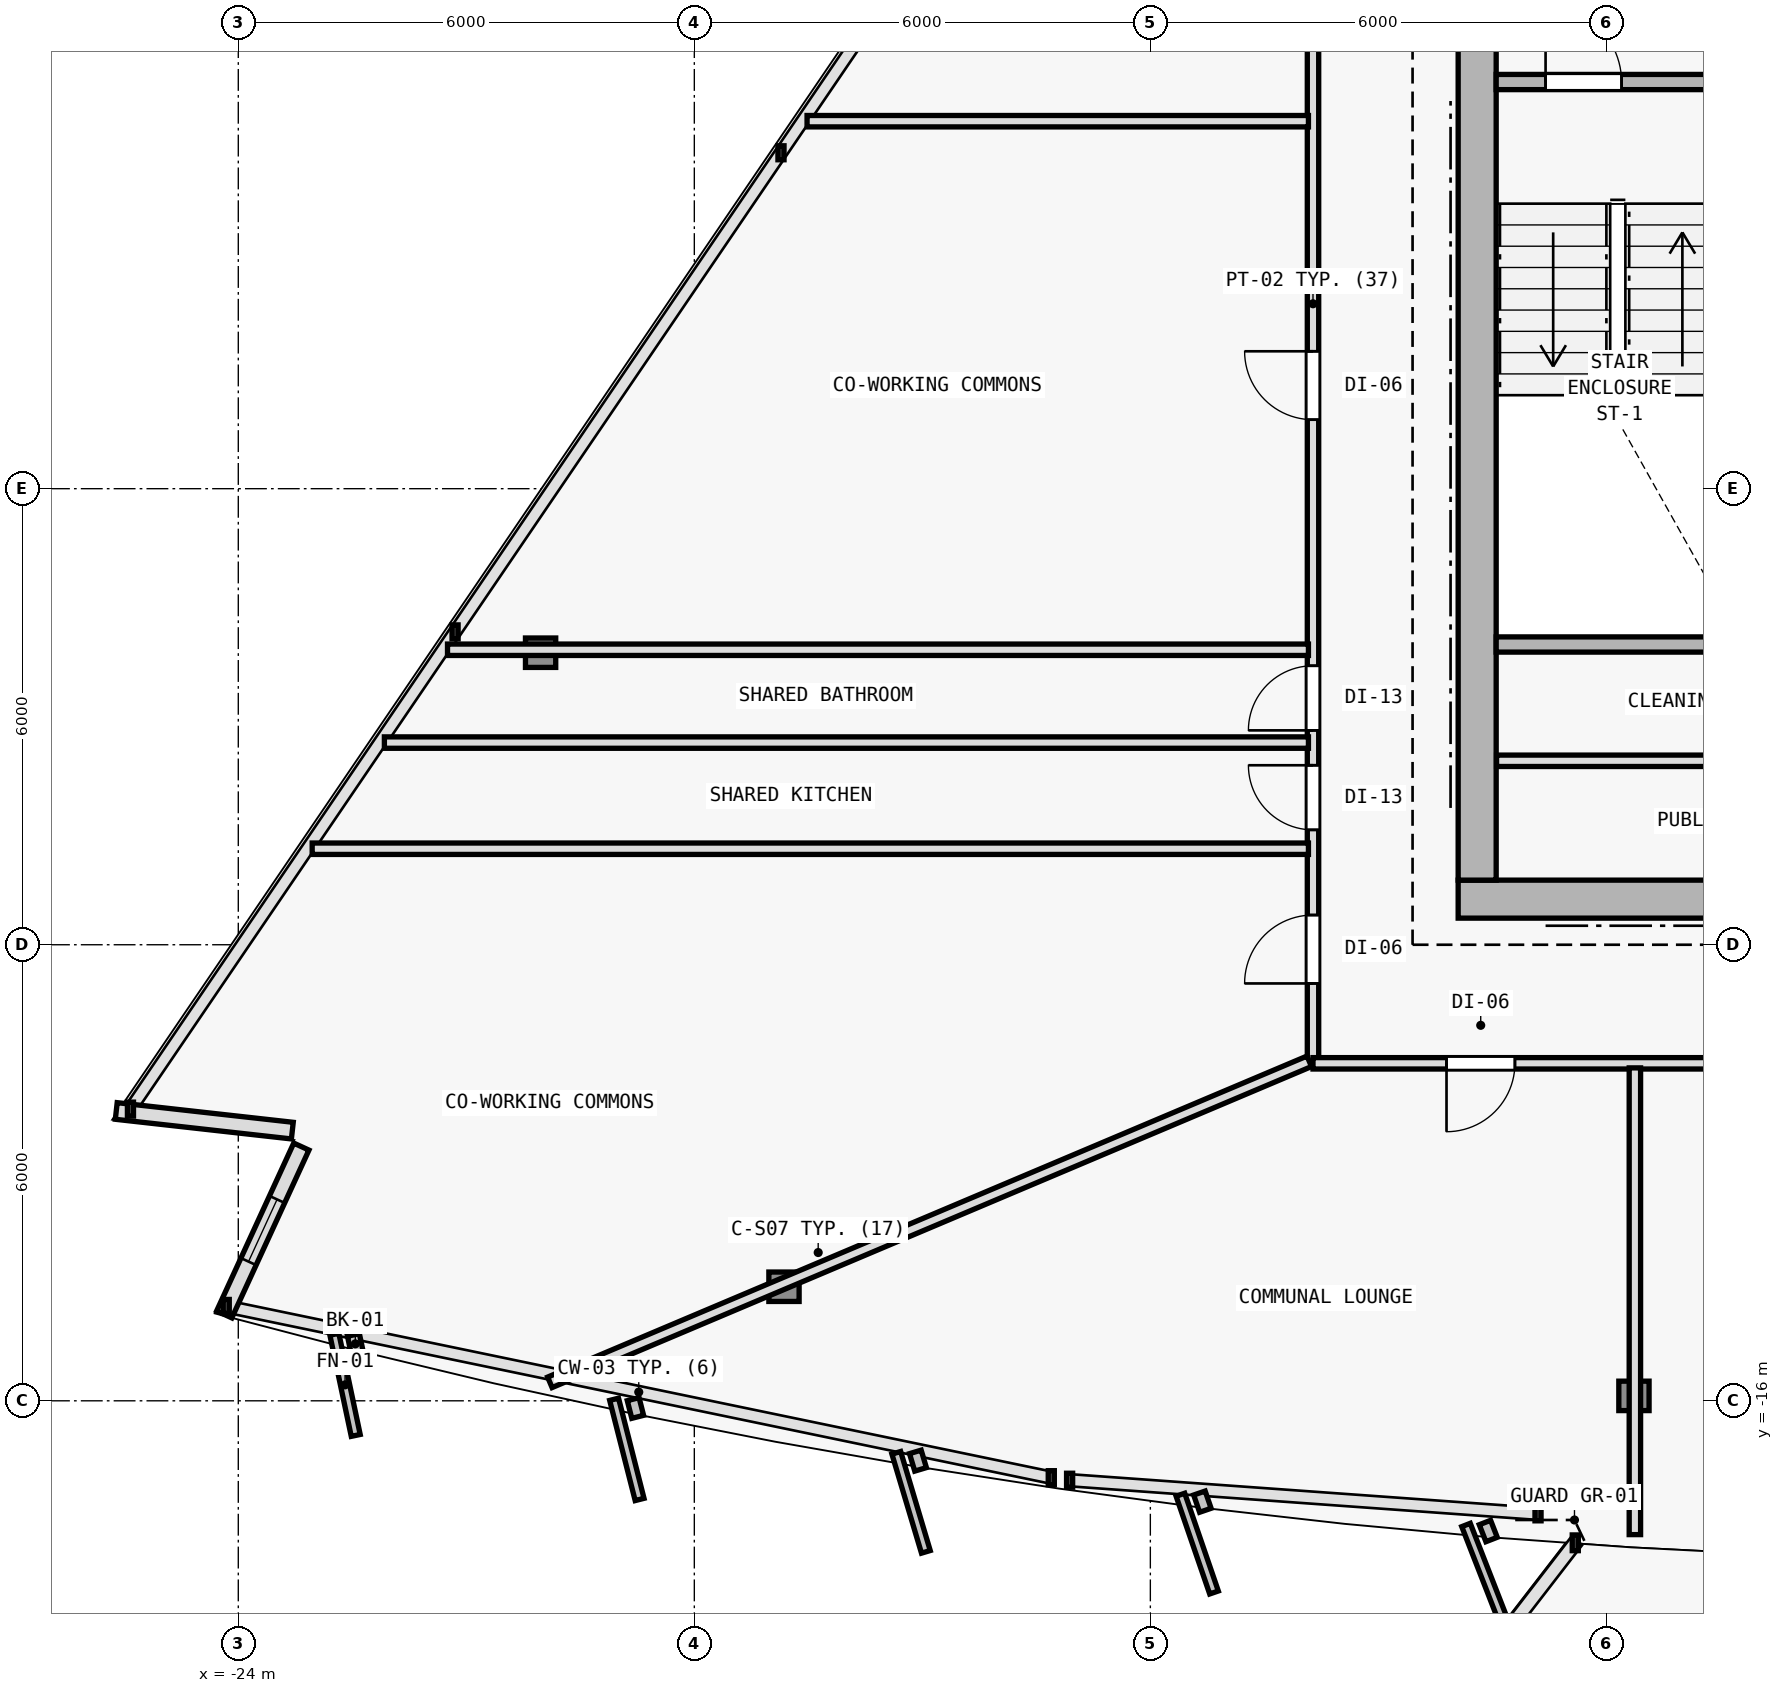
"""IFC4 building model, lengths in metres.
Left out: names, types, materials, properties, quantities, classifications, styles, units other than length and angle.
Written with IfcOpenShell. Run it as: python <this file> out.ifc"""

import sys

from ifc_helpers import new_model, si_unit, direction, frame, frame_2d, origin, origin_2d, place, context, subcontext, project, spatial, rectangle, i_section, extrude, element, fill, save


model = new_model("IFC4")
c1 = context("Model", 3, precision=1e-05, world=origin(), true_north=direction((0.0, 1.0)))
c2 = subcontext(c1, "Body", "Model", "MODEL_VIEW")
j1 = project(units=[si_unit("LENGTHUNIT", "METRE"), si_unit("PLANEANGLEUNIT", "RADIAN")], contexts=[c1])
p1 = place(None, origin())
s1 = spatial("IfcSite", under=j1, at=p1, CompositionType="ELEMENT")
p2 = place(p1, origin())
s2 = spatial("IfcBuilding", under=s1, at=p2, CompositionType="ELEMENT")
p3 = place(p2, frame((0.0, 0.0, 205.5)))
s3 = spatial("IfcBuildingStorey", under=s2, at=p3, CompositionType="ELEMENT", Elevation=205.5)
p4 = place(p3, frame((-7.7, -9.4, 0.0), z_axis=(0.0, 0.0, 1.0), x_axis=(1.0, 0.0, 0.0)))
e1 = element("IfcColumn", 1, at=p4, inside=s3, PredefinedType="COLUMN", context=c2, shape_type="SweptSolid", body=[
    extrude(i_section(OverallWidth=0.398, OverallDepth=0.387, WebThickness=0.013, FlangeThickness=0.022, FilletRadius=0.015, at=origin_2d()), origin(), (0.0, 0.0, 1.0), 3.6),
])
p5 = place(p3, frame((-16.82, -14.5, 0.006), z_axis=(0.020664238418, 0.033511412961, 0.999224686671), x_axis=(-0.851183725565, 0.524867855115, 0.0)))
e2 = element("IfcColumn", 2, at=p5, inside=s3, PredefinedType="COLUMN", context=c2, shape_type="SweptSolid", body=[
    extrude(i_section(OverallWidth=0.398, OverallDepth=0.387, WebThickness=0.013, FlangeThickness=0.022, FilletRadius=0.015, at=origin_2d()), origin(), (0.0, 0.0, 1.0), 3.592),
])
p6 = place(p3, frame((-5.637, -15.935, 0.006), z_axis=(0.006866308162, 0.0352833063, 0.999353762243), x_axis=(-0.981585848295, 0.191021523464, 0.0)))
e3 = element("IfcColumn", 3, at=p6, inside=s3, PredefinedType="COLUMN", context=c2, shape_type="SweptSolid", body=[
    extrude(i_section(OverallWidth=0.398, OverallDepth=0.387, WebThickness=0.013, FlangeThickness=0.022, FilletRadius=0.015, at=origin_2d()), origin(), (0.0, 0.0, 1.0), 3.591),
])
p7 = place(p3, frame((-20.023, -6.158, 0.006), z_axis=(0.025292109804, 0.02162067451, 0.999446274502), x_axis=(-0.649781149204, 0.760121344352, 0.0)))
e4 = element("IfcColumn", 4, at=p7, inside=s3, PredefinedType="COLUMN", context=c2, shape_type="SweptSolid", body=[
    extrude(i_section(OverallWidth=0.398, OverallDepth=0.387, WebThickness=0.013, FlangeThickness=0.022, FilletRadius=0.015, at=origin_2d()), origin(), (0.0, 0.0, 1.0), 3.591),
])
p8 = place(p3, frame((-23.289, -12.446, 0.0), z_axis=(0.0, 0.0, 1.0), x_axis=(-0.993829972675, 0.110914315635, 0.0)))
e5 = element("IfcWall", 5, at=p8, inside=s3, PredefinedType="SOLIDWALL", context=c2, shape_type="SweptSolid", body=[
    extrude(rectangle(XDim=2.331, YDim=0.22, at=frame_2d((1.166, 0.0))), origin(), (0.0, 0.0, 1.0), 3.35),
])
p9 = place(p3, frame((-24.185, -14.863, 0.0), z_axis=(0.0, 0.0, 1.0), x_axis=(0.417509141111, 0.90867272276, 0.0)))
e6 = element("IfcWall", 6, at=p9, inside=s3, PredefinedType="SOLIDWALL", context=c2, shape_type="SweptSolid", body=[
    extrude(rectangle(XDim=2.43, YDim=0.22, at=frame_2d((1.215, 0.0))), origin(), (0.0, 0.0, 1.0), 3.35),
])
p10 = place(p9, frame((0.765, 0.0, 0.62)))
e7 = element("IfcOpeningElement", 7, at=p10, cuts=e6, PredefinedType="OPENING", context=c2, shape_type="SweptSolid", body=[
    extrude(rectangle(XDim=0.9, YDim=1.6, at=frame_2d((0.45, 0.8))), frame((0.0, 0.12, 0.0), z_axis=(0.0, -1.0, 0.0), x_axis=(1.0, 0.0, 0.0)), (0.0, 0.0, 1.0), 0.24),
])
p11 = place(p3, frame((-7.95, -9.4, 0.0), z_axis=(0.0, 0.0, 1.0), x_axis=(1.0, 0.0, 0.0)))
e8 = element("IfcWall", 8, at=p11, inside=s3, PredefinedType="SHEAR", context=c2, shape_type="SweptSolid", body=[
    extrude(rectangle(XDim=15.9, YDim=0.5, at=frame_2d((7.95, 0.0))), origin(), (0.0, 0.0, 1.0), 3.35),
])
p12 = place(p11, frame((9.6, 0.0, 0.0)))
e9 = element("IfcOpeningElement", 9, at=p12, cuts=e8, PredefinedType="OPENING", context=c2, shape_type="SweptSolid", body=[
    extrude(rectangle(XDim=1.5, YDim=2.2, at=frame_2d((0.75, 1.1))), frame((0.0, 0.26, 0.0), z_axis=(0.0, -1.0, 0.0), x_axis=(1.0, 0.0, 0.0)), (0.0, 0.0, 1.0), 0.52),
])
p13 = place(p3, frame((-7.7, -9.15, 0.0), z_axis=(0.0, 0.0, 1.0), x_axis=(0.0, 1.0, 0.0)))
e10 = element("IfcWall", 10, at=p13, inside=s3, PredefinedType="SHEAR", context=c2, shape_type="SweptSolid", body=[
    extrude(rectangle(XDim=19.1, YDim=0.5, at=frame_2d((9.55, 0.0))), origin(), (0.0, 0.0, 1.0), 3.35),
])
p14 = place(p13, frame((12.7, 0.0, 0.0)))
e11 = element("IfcOpeningElement", 11, at=p14, cuts=e10, PredefinedType="OPENING", context=c2, shape_type="SweptSolid", body=[
    extrude(rectangle(XDim=1.1, YDim=2.15, at=frame_2d((0.55, 1.075))), frame((0.0, 0.26, 0.0), z_axis=(0.0, -1.0, 0.0), x_axis=(1.0, 0.0, 0.0)), (0.0, 0.0, 1.0), 0.52),
])
p15 = place(p3, frame((-7.45, 1.35, 0.0), z_axis=(0.0, 0.0, 1.0), x_axis=(1.0, 0.0, 0.0)))
e12 = element("IfcWall", 12, at=p15, inside=s3, PredefinedType="SOLIDWALL", context=c2, shape_type="SweptSolid", body=[
    extrude(rectangle(XDim=3.4, YDim=0.2, at=frame_2d((1.7, 0.0))), origin(), (0.0, 0.0, 1.0), 3.35),
])
p16 = place(p15, frame((0.65, 0.0, 0.0)))
e13 = element("IfcOpeningElement", 13, at=p16, cuts=e12, PredefinedType="OPENING", context=c2, shape_type="SweptSolid", body=[
    extrude(rectangle(XDim=1.0, YDim=2.15, at=frame_2d((0.5, 1.075))), frame((0.0, 0.11, 0.0), z_axis=(0.0, -1.0, 0.0), x_axis=(1.0, 0.0, 0.0)), (0.0, 0.0, 1.0), 0.22),
])
p17 = place(p3, frame((-7.45, -6.05, 0.0), z_axis=(0.0, 0.0, 1.0), x_axis=(1.0, 0.0, 0.0)))
e14 = element("IfcWall", 14, at=p17, inside=s3, PredefinedType="SOLIDWALL", context=c2, shape_type="SweptSolid", body=[
    extrude(rectangle(XDim=3.4, YDim=0.2, at=frame_2d((1.7, 0.0))), origin(), (0.0, 0.0, 1.0), 3.35),
])
p18 = place(p3, frame((-7.445, -7.58, 0.0), z_axis=(0.0, 0.0, 1.0), x_axis=(1.0, 0.0, 0.0)))
e15 = element("IfcWall", 15, at=p18, inside=s3, PredefinedType="PARTITIONING", context=c2, shape_type="SweptSolid", body=[
    extrude(rectangle(XDim=6.195, YDim=0.15, at=frame_2d((3.098, 0.0))), origin(), (0.0, 0.0, 1.0), 3.35),
])
p19 = place(p3, frame((-9.86, -11.56, 0.0), z_axis=(0.0, 0.0, 1.0), x_axis=(0.0, 1.0, 0.0)))
e16 = element("IfcWall", 16, at=p19, inside=s3, PredefinedType="PARTITIONING", context=c2, shape_type="SweptSolid", body=[
    extrude(rectangle(XDim=19.986, YDim=0.15, at=frame_2d((9.993, 0.0))), origin(), (0.0, 0.0, 1.0), 2.825),
])
p20 = place(p19, frame((8.468, 0.0, 0.0)))
e17 = element("IfcOpeningElement", 17, at=p20, cuts=e16, PredefinedType="OPENING", context=c2, shape_type="SweptSolid", body=[
    extrude(rectangle(XDim=0.9, YDim=2.1, at=frame_2d((0.45, 1.05))), frame((0.0, 0.085, 0.0), z_axis=(0.0, -1.0, 0.0), x_axis=(1.0, 0.0, 0.0)), (0.0, 0.0, 1.0), 0.17),
])
p21 = place(p19, frame((4.38, 0.0, 0.0)))
e18 = element("IfcOpeningElement", 18, at=p21, cuts=e16, PredefinedType="OPENING", context=c2, shape_type="SweptSolid", body=[
    extrude(rectangle(XDim=0.85, YDim=2.1, at=frame_2d((0.425, 1.05))), frame((0.0, 0.085, 0.0), z_axis=(0.0, -1.0, 0.0), x_axis=(1.0, 0.0, 0.0)), (0.0, 0.0, 1.0), 0.17),
])
p22 = place(p19, frame((3.071, 0.0, 0.0)))
e19 = element("IfcOpeningElement", 19, at=p22, cuts=e16, PredefinedType="OPENING", context=c2, shape_type="SweptSolid", body=[
    extrude(rectangle(XDim=0.85, YDim=2.1, at=frame_2d((0.425, 1.05))), frame((0.0, 0.085, 0.0), z_axis=(0.0, -1.0, 0.0), x_axis=(1.0, 0.0, 0.0)), (0.0, 0.0, 1.0), 0.17),
])
p23 = place(p19, frame((1.051, 0.0, 0.0)))
e20 = element("IfcOpeningElement", 20, at=p23, cuts=e16, PredefinedType="OPENING", context=c2, shape_type="SweptSolid", body=[
    extrude(rectangle(XDim=0.9, YDim=2.1, at=frame_2d((0.45, 1.05))), frame((0.0, 0.085, 0.0), z_axis=(0.0, -1.0, 0.0), x_axis=(1.0, 0.0, 0.0)), (0.0, 0.0, 1.0), 0.17),
])
p24 = place(p19, frame((15.651, 0.0, 0.0)))
e21 = element("IfcOpeningElement", 21, at=p24, cuts=e16, PredefinedType="OPENING", context=c2, shape_type="SweptSolid", body=[
    extrude(rectangle(XDim=0.9, YDim=2.1, at=frame_2d((0.45, 1.05))), frame((0.0, 0.085, 0.0), z_axis=(0.0, -1.0, 0.0), x_axis=(1.0, 0.0, 0.0)), (0.0, 0.0, 1.0), 0.17),
])
p25 = place(p3, frame((13.18, -11.56, 0.0), z_axis=(0.0, 0.0, 1.0), x_axis=(-1.0, 0.0, 0.0)))
e22 = element("IfcWall", 22, at=p25, inside=s3, PredefinedType="PARTITIONING", context=c2, shape_type="SweptSolid", body=[
    extrude(rectangle(XDim=23.04, YDim=0.15, at=frame_2d((11.52, 0.0))), origin(), (0.0, 0.0, 1.0), 2.825),
])
p26 = place(p25, frame((20.383, 0.0, 0.0)))
e23 = element("IfcOpeningElement", 23, at=p26, cuts=e22, PredefinedType="OPENING", context=c2, shape_type="SweptSolid", body=[
    extrude(rectangle(XDim=0.9, YDim=2.1, at=frame_2d((0.45, 1.05))), frame((0.0, 0.085, 0.0), z_axis=(0.0, -1.0, 0.0), x_axis=(1.0, 0.0, 0.0)), (0.0, 0.0, 1.0), 0.17),
])
p27 = place(p25, frame((12.73, 0.0, 0.0)))
e24 = element("IfcOpeningElement", 24, at=p27, cuts=e22, PredefinedType="OPENING", context=c2, shape_type="SweptSolid", body=[
    extrude(rectangle(XDim=0.9, YDim=2.1, at=frame_2d((0.45, 1.05))), frame((0.0, 0.085, 0.0), z_axis=(0.0, -1.0, 0.0), x_axis=(1.0, 0.0, 0.0)), (0.0, 0.0, 1.0), 0.17),
])
p28 = place(p25, frame((3.417, 0.0, 0.0)))
e25 = element("IfcOpeningElement", 25, at=p28, cuts=e22, PredefinedType="OPENING", context=c2, shape_type="SweptSolid", body=[
    extrude(rectangle(XDim=0.9, YDim=2.1, at=frame_2d((0.45, 1.05))), frame((0.0, 0.085, 0.0), z_axis=(0.0, -1.0, 0.0), x_axis=(1.0, 0.0, 0.0)), (0.0, 0.0, 1.0), 0.17),
])
p29 = place(p3, frame((-9.909, -11.533, 0.0), z_axis=(0.0, 0.0, 1.0), x_axis=(-0.921088356207, -0.389353618269, 0.0)))
e26 = element("IfcWall", 26, at=p29, inside=s3, PredefinedType="PARTITIONING", context=c2, shape_type="SweptSolid", body=[
    extrude(rectangle(XDim=10.847, YDim=0.15, at=frame_2d((5.424, 0.0))), origin(), (0.0, 0.0, 1.0), 2.775),
])
p30 = place(p3, frame((-5.625, -11.62, 0.0), z_axis=(0.0, 0.0, 1.0), x_axis=(0.0, -1.0, 0.0)))
e27 = element("IfcWall", 27, at=p30, inside=s3, PredefinedType="PARTITIONING", context=c2, shape_type="SweptSolid", body=[
    extrude(rectangle(XDim=6.14, YDim=0.15, at=frame_2d((3.07, 0.0))), origin(), (0.0, 0.0, 1.0), 2.775),
])
p31 = place(p3, frame((-9.92, -6.119, 0.0), z_axis=(0.0, 0.0, 1.0), x_axis=(-1.0, 0.0, 0.0)))
e28 = element("IfcWall", 28, at=p31, inside=s3, PredefinedType="PARTITIONING", context=c2, shape_type="SweptSolid", body=[
    extrude(rectangle(XDim=11.327, YDim=0.15, at=frame_2d((5.664, 0.0))), origin(), (0.0, 0.0, 1.0), 2.775),
])
p32 = place(p3, frame((-9.92, -8.737, 0.0), z_axis=(0.0, 0.0, 1.0), x_axis=(-1.0, 0.0, 0.0)))
e29 = element("IfcWall", 29, at=p32, inside=s3, PredefinedType="PARTITIONING", context=c2, shape_type="SweptSolid", body=[
    extrude(rectangle(XDim=13.108, YDim=0.15, at=frame_2d((6.554, 0.0))), origin(), (0.0, 0.0, 1.0), 2.825),
])
p33 = place(p3, frame((-9.92, -7.34, 0.0), z_axis=(0.0, 0.0, 1.0), x_axis=(-1.0, 0.0, 0.0)))
e30 = element("IfcWall", 30, at=p33, inside=s3, PredefinedType="PARTITIONING", context=c2, shape_type="SweptSolid", body=[
    extrude(rectangle(XDim=12.158, YDim=0.15, at=frame_2d((6.079, 0.0))), origin(), (0.0, 0.0, 1.0), 2.775),
])
p34 = place(p3, frame((-9.92, 0.835, 0.0), z_axis=(0.0, 0.0, 1.0), x_axis=(-1.0, 0.0, 0.0)))
e31 = element("IfcWall", 31, at=p34, inside=s3, PredefinedType="PARTITIONING", context=c2, shape_type="SweptSolid", body=[
    extrude(rectangle(XDim=6.597, YDim=0.15, at=frame_2d((3.298, 0.0))), origin(), (0.0, 0.0, 1.0), 2.775),
])
p35 = place(p10, origin())
e32 = element("IfcWindow", 32, at=p35, inside=s3, PartitioningType="SINGLE_PANEL", PredefinedType="WINDOW", context=c2, shape_type="SweptSolid", body=[
    extrude(rectangle(XDim=0.9, YDim=1.6, at=frame_2d((0.45, 0.8))), frame((0.0, 0.03, 0.0), z_axis=(0.0, -1.0, 0.0), x_axis=(1.0, 0.0, 0.0)), (0.0, 0.0, 1.0), 0.06),
])
fill(e7, e32)
p36 = place(p16, origin())
e33 = element("IfcDoor", 33, at=p36, inside=s3, OperationType="SINGLE_SWING_LEFT", PredefinedType="DOOR", context=c2, shape_type="SweptSolid", body=[
    extrude(rectangle(XDim=1.0, YDim=2.15, at=frame_2d((0.5, 1.075))), frame((0.0, 0.025, 0.0), z_axis=(0.0, -1.0, 0.0), x_axis=(1.0, 0.0, 0.0)), (0.0, 0.0, 1.0), 0.05),
])
fill(e13, e33)
p37 = place(p20, origin())
e34 = element("IfcDoor", 34, at=p37, inside=s3, OperationType="SINGLE_SWING_RIGHT", PredefinedType="DOOR", context=c2, shape_type="SweptSolid", body=[
    extrude(rectangle(XDim=0.9, YDim=2.1, at=frame_2d((0.45, 1.05))), frame((0.0, 0.025, 0.0), z_axis=(0.0, -1.0, 0.0), x_axis=(1.0, 0.0, 0.0)), (0.0, 0.0, 1.0), 0.05),
])
fill(e17, e34)
p38 = place(p21, origin())
e35 = element("IfcDoor", 35, at=p38, inside=s3, OperationType="SINGLE_SWING_LEFT", PredefinedType="DOOR", context=c2, shape_type="SweptSolid", body=[
    extrude(rectangle(XDim=0.85, YDim=2.1, at=frame_2d((0.425, 1.05))), frame((0.0, 0.025, 0.0), z_axis=(0.0, -1.0, 0.0), x_axis=(1.0, 0.0, 0.0)), (0.0, 0.0, 1.0), 0.05),
])
fill(e18, e35)
p39 = place(p22, origin())
e36 = element("IfcDoor", 36, at=p39, inside=s3, OperationType="SINGLE_SWING_RIGHT", PredefinedType="DOOR", context=c2, shape_type="SweptSolid", body=[
    extrude(rectangle(XDim=0.85, YDim=2.1, at=frame_2d((0.425, 1.05))), frame((0.0, 0.025, 0.0), z_axis=(0.0, -1.0, 0.0), x_axis=(1.0, 0.0, 0.0)), (0.0, 0.0, 1.0), 0.05),
])
fill(e19, e36)
p40 = place(p23, origin())
e37 = element("IfcDoor", 37, at=p40, inside=s3, OperationType="SINGLE_SWING_LEFT", PredefinedType="DOOR", context=c2, shape_type="SweptSolid", body=[
    extrude(rectangle(XDim=0.9, YDim=2.1, at=frame_2d((0.45, 1.05))), frame((0.0, 0.025, 0.0), z_axis=(0.0, -1.0, 0.0), x_axis=(1.0, 0.0, 0.0)), (0.0, 0.0, 1.0), 0.05),
])
fill(e20, e37)
p41 = place(p26, origin())
e38 = element("IfcDoor", 38, at=p41, inside=s3, OperationType="SINGLE_SWING_RIGHT", PredefinedType="DOOR", context=c2, shape_type="SweptSolid", body=[
    extrude(rectangle(XDim=0.9, YDim=2.1, at=frame_2d((0.45, 1.05))), frame((0.0, 0.025, 0.0), z_axis=(0.0, -1.0, 0.0), x_axis=(1.0, 0.0, 0.0)), (0.0, 0.0, 1.0), 0.05),
])
fill(e23, e38)
save(model, sys.argv[1])
